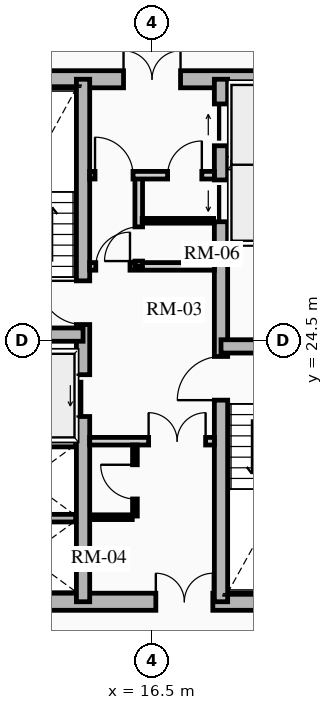
"""IFC4 building model, lengths in metres.
Left out: names, types, materials, properties, quantities, classifications, styles, units other than length and angle.
Written with IfcOpenShell. Run it as: python <this file> out.ifc"""

import sys

from ifc_helpers import new_model, si_unit, direction, frame, frame_2d, origin, place, context, subcontext, project, spatial, rectangle, extrude, source, transform, mapped, element, fill, save


model = new_model("IFC4")
c1 = context("Model", 3, precision=1e-05, world=origin(), true_north=direction((0.0, 1.0)))
c2 = subcontext(c1, "Body", "Model", "MODEL_VIEW")
j1 = project(units=[si_unit("LENGTHUNIT", "METRE"), si_unit("PLANEANGLEUNIT", "RADIAN")], contexts=[c1])
p1 = place(None, origin())
s1 = spatial("IfcSite", under=j1, at=p1, CompositionType="ELEMENT")
p2 = place(p1, origin())
s2 = spatial("IfcBuilding", under=s1, at=p2, CompositionType="ELEMENT")
p3 = place(p2, frame((0.0, 0.0, 90.52)))
s3 = spatial("IfcBuildingStorey", under=s2, at=p3, CompositionType="ELEMENT", Elevation=90.52)
p4 = place(p3, frame((11.15, 17.625, 0.0), z_axis=(0.0, 0.0, 1.0), x_axis=(1.0, 0.0, 0.0)))
e1 = element("IfcWall", 1, at=p4, inside=s3, PredefinedType="SHEAR", context=c2, shape_type="SweptSolid", body=[
    extrude(rectangle(XDim=10.7, YDim=0.45, at=frame_2d((5.35, 0.0))), origin(), (0.0, 0.0, 1.0), 2.91),
])
m1 = source(origin(), c2, "Body", "SweptSolid", [
    extrude(rectangle(XDim=1.5, YDim=2.02, at=frame_2d((0.75, 1.01))), frame((0.0, 0.235, 0.0), z_axis=(0.0, -1.0, 0.0), x_axis=(1.0, 0.0, 0.0)), (0.0, 0.0, 1.0), 0.47),
])
p5 = place(p4, frame((5.45, 0.0, 0.0)))
e2 = element("IfcOpeningElement", 2, at=p5, cuts=e1, PredefinedType="OPENING", context=c2, shape_type="MappedRepresentation", body=[
    mapped(m1, transform((0.0, 0.0, 0.0), x_axis=(1.0, 0.0, 0.0), y_axis=(0.0, 1.0, 0.0), z_axis=(0.0, 0.0, 1.0), scale=1.0)),
])
p6 = place(p3, frame((11.15, 31.375, 0.0), z_axis=(0.0, 0.0, 1.0), x_axis=(1.0, 0.0, 0.0)))
e3 = element("IfcWall", 3, at=p6, inside=s3, PredefinedType="SHEAR", context=c2, shape_type="SweptSolid", body=[
    extrude(rectangle(XDim=10.7, YDim=0.45, at=frame_2d((5.35, 0.0))), origin(), (0.0, 0.0, 1.0), 2.91),
])
p7 = place(p6, frame((4.6, 0.0, 0.0)))
e4 = element("IfcOpeningElement", 4, at=p7, cuts=e3, PredefinedType="OPENING", context=c2, shape_type="MappedRepresentation", body=[
    mapped(m1, transform((0.0, 0.0, 0.0), x_axis=(1.0, 0.0, 0.0), y_axis=(0.0, 1.0, 0.0), z_axis=(0.0, 0.0, 1.0), scale=1.0)),
])
p8 = place(p3, frame((14.685, 17.625, 0.0), z_axis=(0.0, 0.0, 1.0), x_axis=(0.0, 1.0, 0.0)))
e5 = element("IfcWall", 5, at=p8, inside=s3, PredefinedType="SHEAR", context=c2, shape_type="SweptSolid", body=[
    extrude(rectangle(XDim=13.75, YDim=0.35, at=frame_2d((6.875, 0.0))), origin(), (0.0, 0.0, 1.0), 2.91),
])
m2 = source(origin(), c2, "Body", "SweptSolid", [
    extrude(rectangle(XDim=1.1, YDim=2.015, at=frame_2d((0.55, 1.007))), frame((0.0, 0.185, 0.0), z_axis=(0.0, -1.0, 0.0), x_axis=(1.0, 0.0, 0.0)), (0.0, 0.0, 1.0), 0.37),
])
p9 = place(p8, frame((4.875, 0.0, 0.0)))
e6 = element("IfcOpeningElement", 6, at=p9, cuts=e5, PredefinedType="OPENING", context=c2, shape_type="MappedRepresentation", body=[
    mapped(m2, transform((0.0, 0.0, 0.0), x_axis=(1.0, 0.0, 0.0), y_axis=(0.0, 1.0, 0.0), z_axis=(0.0, 0.0, 1.0), scale=1.0)),
])
m3 = source(origin(), c2, "Body", "SweptSolid", [
    extrude(rectangle(XDim=1.15, YDim=2.02, at=frame_2d((0.575, 1.01))), frame((0.0, 0.185, 0.0), z_axis=(0.0, -1.0, 0.0), x_axis=(1.0, 0.0, 0.0)), (0.0, 0.0, 1.0), 0.37),
])
p10 = place(p8, frame((7.295, 0.0, 0.0)))
e7 = element("IfcOpeningElement", 7, at=p10, cuts=e5, PredefinedType="OPENING", context=c2, shape_type="MappedRepresentation", body=[
    mapped(m3, transform((0.0, 0.0, 0.0), x_axis=(1.0, 0.0, 0.0), y_axis=(0.0, 1.0, 0.0), z_axis=(0.0, 0.0, 1.0), scale=1.0)),
])
p11 = place(p3, frame((18.315, 17.625, 0.0), z_axis=(0.0, 0.0, 1.0), x_axis=(0.0, 1.0, 0.0)))
e8 = element("IfcWall", 8, at=p11, inside=s3, PredefinedType="SHEAR", context=c2, shape_type="SweptSolid", body=[
    extrude(rectangle(XDim=13.75, YDim=0.35, at=frame_2d((6.875, 0.0))), origin(), (0.0, 0.0, 1.0), 2.91),
])
p12 = place(p11, frame((10.0, 0.0, 0.0)))
e9 = element("IfcOpeningElement", 9, at=p12, cuts=e8, PredefinedType="OPENING", context=c2, shape_type="MappedRepresentation", body=[
    mapped(m2, transform((0.0, 0.0, 0.0), x_axis=(1.0, 0.0, 0.0), y_axis=(0.0, 1.0, 0.0), z_axis=(0.0, 0.0, 1.0), scale=1.0)),
])
p13 = place(p11, frame((12.0, 0.0, 0.0)))
e10 = element("IfcOpeningElement", 10, at=p13, cuts=e8, PredefinedType="OPENING", context=c2, shape_type="MappedRepresentation", body=[
    mapped(m2, transform((0.0, 0.0, 0.0), x_axis=(1.0, 0.0, 0.0), y_axis=(0.0, 1.0, 0.0), z_axis=(0.0, 0.0, 1.0), scale=1.0)),
])
p14 = place(p11, frame((5.305, 0.0, 0.0)))
e11 = element("IfcOpeningElement", 11, at=p14, cuts=e8, PredefinedType="OPENING", context=c2, shape_type="MappedRepresentation", body=[
    mapped(m3, transform((0.0, 0.0, 0.0), x_axis=(1.0, 0.0, 0.0), y_axis=(0.0, 1.0, 0.0), z_axis=(0.0, 0.0, 1.0), scale=1.0)),
])
for number, where, z_axis, x_axis in (
    (12, (11.4, 24.655, 0.0), (0.0, 0.0, 1.0), (1.0, 0.0, 0.0)),
    (13, (18.315, 24.345, 0.0), (0.0, 0.0, 1.0), (1.0, 0.0, 0.0)),
):
    element("IfcWall", number, at=place(p3, frame(where, z_axis=z_axis, x_axis=x_axis)), inside=s3, PredefinedType="SHEAR", context=c2, shape_type="SweptSolid", body=[
        extrude(rectangle(XDim=3.285, YDim=0.35, at=frame_2d((1.643, 0.0))), origin(), (0.0, 0.0, 1.0), 2.91),
    ])
for number, where, z_axis, x_axis in (
    (14, (11.52, 21.8, 0.0), (0.0, 0.0, 1.0), (1.0, 0.0, 0.0)),
    (15, (11.52, 19.825, 0.0), (0.0, 0.0, 1.0), (1.0, 0.0, 0.0)),
    (16, (18.51, 27.13, 0.0), (0.0, 0.0, 1.0), (1.0, 0.0, 0.0)),
    (17, (18.51, 29.175, 0.0), (0.0, 0.0, 1.0), (1.0, 0.0, 0.0)),
):
    element("IfcWall", number, at=place(p3, frame(where, z_axis=z_axis, x_axis=x_axis)), inside=s3, PredefinedType="SHEAR", context=c2, shape_type="SweptSolid", body=[
        extrude(rectangle(XDim=2.97, YDim=0.2, at=frame_2d((1.485, 0.0))), origin(), (0.0, 0.0, 1.0), 2.91),
    ])
p15 = place(p3, frame((14.86, 21.85, 0.0), z_axis=(0.0, 0.0, 1.0), x_axis=(1.0, 0.0, 0.0)))
e18 = element("IfcWall", 18, at=p15, inside=s3, PredefinedType="PARTITIONING", context=c2, shape_type="SweptSolid", body=[
    extrude(rectangle(XDim=3.28, YDim=0.2, at=frame_2d((1.64, 0.0))), origin(), (0.0, 0.0, 1.0), 2.655),
])
m4 = source(origin(), c2, "Body", "SweptSolid", [
    extrude(rectangle(XDim=1.5, YDim=2.02, at=frame_2d((0.75, 1.01))), frame((0.0, 0.11, 0.0), z_axis=(0.0, -1.0, 0.0), x_axis=(1.0, 0.0, 0.0)), (0.0, 0.0, 1.0), 0.22),
])
p16 = place(p15, frame((1.55, 0.0, 0.0)))
e19 = element("IfcOpeningElement", 19, at=p16, cuts=e18, PredefinedType="OPENING", context=c2, shape_type="MappedRepresentation", body=[
    mapped(m4, transform((0.0, 0.0, 0.0), x_axis=(1.0, 0.0, 0.0), y_axis=(0.0, 1.0, 0.0), z_axis=(0.0, 0.0, 1.0), scale=1.0)),
])
p17 = place(p3, frame((14.86, 26.45, 0.0), z_axis=(0.0, 0.0, 1.0), x_axis=(1.0, 0.0, 0.0)))
e20 = element("IfcWall", 20, at=p17, inside=s3, PredefinedType="PARTITIONING", context=c2, shape_type="SweptSolid", body=[
    extrude(rectangle(XDim=3.28, YDim=0.2, at=frame_2d((1.64, 0.0))), origin(), (0.0, 0.0, 1.0), 2.655),
])
m5 = source(origin(), c2, "Body", "SweptSolid", [
    extrude(rectangle(XDim=0.9, YDim=2.005, at=frame_2d((0.45, 1.002))), frame((0.0, 0.11, 0.0), z_axis=(0.0, -1.0, 0.0), x_axis=(1.0, 0.0, 0.0)), (0.0, 0.0, 1.0), 0.22),
])
p18 = place(p17, frame((0.16, 0.0, 0.0)))
e21 = element("IfcOpeningElement", 21, at=p18, cuts=e20, PredefinedType="OPENING", context=c2, shape_type="MappedRepresentation", body=[
    mapped(m5, transform((0.0, 0.0, 0.0), x_axis=(1.0, 0.0, 0.0), y_axis=(0.0, 1.0, 0.0), z_axis=(0.0, 0.0, 1.0), scale=1.0)),
])
p19 = place(p3, frame((16.15, 26.45, 0.0), z_axis=(0.0, 0.0, 1.0), x_axis=(0.0, 1.0, 0.0)))
e22 = element("IfcWall", 22, at=p19, inside=s3, PredefinedType="PARTITIONING", context=c2, shape_type="SweptSolid", body=[
    extrude(rectangle(XDim=2.4, YDim=0.2, at=frame_2d((1.2, 0.0))), origin(), (0.0, 0.0, 1.0), 2.655),
])
p20 = place(p19, frame((0.14, 0.0, 0.0)))
e23 = element("IfcOpeningElement", 23, at=p20, cuts=e22, PredefinedType="OPENING", context=c2, shape_type="MappedRepresentation", body=[
    mapped(m5, transform((0.0, 0.0, 0.0), x_axis=(1.0, 0.0, 0.0), y_axis=(0.0, 1.0, 0.0), z_axis=(0.0, 0.0, 1.0), scale=1.0)),
])
p21 = place(p3, frame((14.86, 28.85, 0.0), z_axis=(0.0, 0.0, 1.0), x_axis=(1.0, 0.0, 0.0)))
e24 = element("IfcWall", 24, at=p21, inside=s3, PredefinedType="PARTITIONING", context=c2, shape_type="SweptSolid", body=[
    extrude(rectangle(XDim=3.28, YDim=0.2, at=frame_2d((1.64, 0.0))), origin(), (0.0, 0.0, 1.0), 2.655),
])
m6 = source(origin(), c2, "Body", "SweptSolid", [
    extrude(rectangle(XDim=1.0, YDim=2.015, at=frame_2d((0.5, 1.007))), frame((0.0, 0.11, 0.0), z_axis=(0.0, -1.0, 0.0), x_axis=(1.0, 0.0, 0.0)), (0.0, 0.0, 1.0), 0.22),
])
p22 = place(p21, frame((0.14, 0.0, 0.0)))
e25 = element("IfcOpeningElement", 25, at=p22, cuts=e24, PredefinedType="OPENING", context=c2, shape_type="MappedRepresentation", body=[
    mapped(m6, transform((0.0, 0.0, 0.0), x_axis=(1.0, 0.0, 0.0), y_axis=(0.0, 1.0, 0.0), z_axis=(0.0, 0.0, 1.0), scale=1.0)),
])
p23 = place(p21, frame((2.05, 0.0, 0.0)))
e26 = element("IfcOpeningElement", 26, at=p23, cuts=e24, PredefinedType="OPENING", context=c2, shape_type="MappedRepresentation", body=[
    mapped(m5, transform((0.0, 0.0, 0.0), x_axis=(1.0, 0.0, 0.0), y_axis=(0.0, 1.0, 0.0), z_axis=(0.0, 0.0, 1.0), scale=1.0)),
])
p24 = place(p3, frame((16.05, 19.88, 0.0), z_axis=(0.0, 0.0, 1.0), x_axis=(0.0, 1.0, 0.0)))
e27 = element("IfcWall", 27, at=p24, inside=s3, PredefinedType="PARTITIONING", context=c2, shape_type="SweptSolid", body=[
    extrude(rectangle(XDim=1.87, YDim=0.125, at=frame_2d((0.935, 0.0))), origin(), (0.0, 0.0, 1.0), 2.655),
])
m7 = source(origin(), c2, "Body", "SweptSolid", [
    extrude(rectangle(XDim=0.9, YDim=2.005, at=frame_2d((0.45, 1.002))), frame((0.0, 0.073, 0.0), z_axis=(0.0, -1.0, 0.0), x_axis=(1.0, 0.0, 0.0)), (0.0, 0.0, 1.0), 0.145),
])
p25 = place(p24, frame((0.45, 0.0, 0.0)))
e28 = element("IfcOpeningElement", 28, at=p25, cuts=e27, PredefinedType="OPENING", context=c2, shape_type="MappedRepresentation", body=[
    mapped(m7, transform((0.0, 0.0, 0.0), x_axis=(1.0, 0.0, 0.0), y_axis=(0.0, 1.0, 0.0), z_axis=(0.0, 0.0, 1.0), scale=1.0)),
])
p26 = place(p3, frame((14.88, 19.85, 0.0), z_axis=(0.0, 0.0, 1.0), x_axis=(1.0, 0.0, 0.0)))
e29 = element("IfcWall", 29, at=p26, inside=s3, PredefinedType="PARTITIONING", context=c2, shape_type="SweptSolid", body=[
    extrude(rectangle(XDim=1.1, YDim=0.125, at=frame_2d((0.55, 0.0))), origin(), (0.0, 0.0, 1.0), 2.655),
])
p27 = place(p3, frame((16.24, 27.65, 0.0), z_axis=(0.0, 0.0, 1.0), x_axis=(1.0, 0.0, 0.0)))
e30 = element("IfcWall", 30, at=p27, inside=s3, PredefinedType="PARTITIONING", context=c2, shape_type="SweptSolid", body=[
    extrude(rectangle(XDim=1.88, YDim=0.125, at=frame_2d((0.94, 0.0))), origin(), (0.0, 0.0, 1.0), 2.655),
])
m8 = source(origin(), c2, "Body", "SweptSolid", [
    extrude(rectangle(XDim=1.1, YDim=2.015, at=frame_2d((0.55, 1.007))), frame((0.0, 0.025, 0.0), z_axis=(0.0, -1.0, 0.0), x_axis=(1.0, 0.0, 0.0)), (0.0, 0.0, 1.0), 0.05),
])
p28 = place(p9, origin())
e31 = element("IfcDoor", 31, at=p28, inside=s3, OperationType="SLIDING_TO_LEFT", PredefinedType="DOOR", context=c2, shape_type="MappedRepresentation", body=[
    mapped(m8, transform((0.0, 0.0, 0.0), x_axis=(1.0, 0.0, 0.0), y_axis=(0.0, 1.0, 0.0), z_axis=(0.0, 0.0, 1.0), scale=1.0)),
])
fill(e6, e31)
p29 = place(p12, origin())
e32 = element("IfcDoor", 32, at=p29, inside=s3, OperationType="SLIDING_TO_LEFT", PredefinedType="DOOR", context=c2, shape_type="MappedRepresentation", body=[
    mapped(m8, transform((0.0, 0.0, 0.0), x_axis=(1.0, 0.0, 0.0), y_axis=(0.0, 1.0, 0.0), z_axis=(0.0, 0.0, 1.0), scale=1.0)),
])
fill(e9, e32)
p30 = place(p13, origin())
e33 = element("IfcDoor", 33, at=p30, inside=s3, OperationType="SLIDING_TO_RIGHT", PredefinedType="DOOR", context=c2, shape_type="MappedRepresentation", body=[
    mapped(m8, transform((0.0, 0.0, 0.0), x_axis=(1.0, 0.0, 0.0), y_axis=(0.0, 1.0, 0.0), z_axis=(0.0, 0.0, 1.0), scale=1.0)),
])
fill(e10, e33)
m9 = source(origin(), c2, "Body", "SweptSolid", [
    extrude(rectangle(XDim=1.15, YDim=2.02, at=frame_2d((0.575, 1.01))), frame((0.0, 0.025, 0.0), z_axis=(0.0, -1.0, 0.0), x_axis=(1.0, 0.0, 0.0)), (0.0, 0.0, 1.0), 0.05),
])
p31 = place(p10, origin())
e34 = element("IfcDoor", 34, at=p31, inside=s3, OperationType="SINGLE_SWING_RIGHT", PredefinedType="DOOR", context=c2, shape_type="MappedRepresentation", body=[
    mapped(m9, transform((0.0, 0.0, 0.0), x_axis=(1.0, 0.0, 0.0), y_axis=(0.0, 1.0, 0.0), z_axis=(0.0, 0.0, 1.0), scale=1.0)),
])
fill(e7, e34)
p32 = place(p14, origin())
e35 = element("IfcDoor", 35, at=p32, inside=s3, OperationType="SINGLE_SWING_LEFT", PredefinedType="DOOR", context=c2, shape_type="MappedRepresentation", body=[
    mapped(m9, transform((0.0, 0.0, 0.0), x_axis=(1.0, 0.0, 0.0), y_axis=(0.0, 1.0, 0.0), z_axis=(0.0, 0.0, 1.0), scale=1.0)),
])
fill(e11, e35)
m10 = source(origin(), c2, "Body", "SweptSolid", [
    extrude(rectangle(XDim=1.5, YDim=2.02, at=frame_2d((0.75, 1.01))), frame((0.0, 0.025, 0.0), z_axis=(0.0, -1.0, 0.0), x_axis=(1.0, 0.0, 0.0)), (0.0, 0.0, 1.0), 0.05),
])
p33 = place(p7, origin())
e36 = element("IfcDoor", 36, at=p33, inside=s3, OperationType="DOUBLE_DOOR_SINGLE_SWING", PredefinedType="DOOR", context=c2, shape_type="MappedRepresentation", body=[
    mapped(m10, transform((0.0, 0.0, 0.0), x_axis=(1.0, 0.0, 0.0), y_axis=(0.0, 1.0, 0.0), z_axis=(0.0, 0.0, 1.0), scale=1.0)),
])
fill(e4, e36)
p34 = place(p5, origin())
e37 = element("IfcDoor", 37, at=p34, inside=s3, OperationType="DOUBLE_DOOR_SINGLE_SWING", PredefinedType="DOOR", context=c2, shape_type="MappedRepresentation", body=[
    mapped(m10, transform((0.0, 0.0, 0.0), x_axis=(1.0, 0.0, 0.0), y_axis=(0.0, 1.0, 0.0), z_axis=(0.0, 0.0, 1.0), scale=1.0)),
])
fill(e2, e37)
p35 = place(p16, origin())
e38 = element("IfcDoor", 38, at=p35, inside=s3, OperationType="DOUBLE_DOOR_SINGLE_SWING", PredefinedType="DOOR", context=c2, shape_type="MappedRepresentation", body=[
    mapped(m10, transform((0.0, 0.0, 0.0), x_axis=(1.0, 0.0, 0.0), y_axis=(0.0, 1.0, 0.0), z_axis=(0.0, 0.0, 1.0), scale=1.0)),
])
fill(e19, e38)
m11 = source(origin(), c2, "Body", "SweptSolid", [
    extrude(rectangle(XDim=0.9, YDim=2.005, at=frame_2d((0.45, 1.002))), frame((0.0, 0.025, 0.0), z_axis=(0.0, -1.0, 0.0), x_axis=(1.0, 0.0, 0.0)), (0.0, 0.0, 1.0), 0.05),
])
p36 = place(p18, origin())
e39 = element("IfcDoor", 39, at=p36, inside=s3, OperationType="SINGLE_SWING_RIGHT", PredefinedType="DOOR", context=c2, shape_type="MappedRepresentation", body=[
    mapped(m11, transform((0.0, 0.0, 0.0), x_axis=(1.0, 0.0, 0.0), y_axis=(0.0, 1.0, 0.0), z_axis=(0.0, 0.0, 1.0), scale=1.0)),
])
fill(e21, e39)
m12 = source(origin(), c2, "Body", "SweptSolid", [
    extrude(rectangle(XDim=1.0, YDim=2.015, at=frame_2d((0.5, 1.007))), frame((0.0, 0.025, 0.0), z_axis=(0.0, -1.0, 0.0), x_axis=(1.0, 0.0, 0.0)), (0.0, 0.0, 1.0), 0.05),
])
p37 = place(p22, origin())
e40 = element("IfcDoor", 40, at=p37, inside=s3, OperationType="SINGLE_SWING_LEFT", PredefinedType="DOOR", context=c2, shape_type="MappedRepresentation", body=[
    mapped(m12, transform((0.0, 0.0, 0.0), x_axis=(1.0, 0.0, 0.0), y_axis=(0.0, 1.0, 0.0), z_axis=(0.0, 0.0, 1.0), scale=1.0)),
])
fill(e25, e40)
p38 = place(p25, origin())
e41 = element("IfcDoor", 41, at=p38, inside=s3, OperationType="SINGLE_SWING_RIGHT", PredefinedType="DOOR", context=c2, shape_type="MappedRepresentation", body=[
    mapped(m11, transform((0.0, 0.0, 0.0), x_axis=(1.0, 0.0, 0.0), y_axis=(0.0, 1.0, 0.0), z_axis=(0.0, 0.0, 1.0), scale=1.0)),
])
fill(e28, e41)
p39 = place(p20, origin())
e42 = element("IfcDoor", 42, at=p39, inside=s3, OperationType="SINGLE_SWING_LEFT", PredefinedType="DOOR", context=c2, shape_type="MappedRepresentation", body=[
    mapped(m11, transform((0.0, 0.0, 0.0), x_axis=(1.0, 0.0, 0.0), y_axis=(0.0, 1.0, 0.0), z_axis=(0.0, 0.0, 1.0), scale=1.0)),
])
fill(e23, e42)
p40 = place(p23, origin())
e43 = element("IfcDoor", 43, at=p40, inside=s3, OperationType="SINGLE_SWING_RIGHT", PredefinedType="DOOR", context=c2, shape_type="MappedRepresentation", body=[
    mapped(m11, transform((0.0, 0.0, 0.0), x_axis=(1.0, 0.0, 0.0), y_axis=(0.0, 1.0, 0.0), z_axis=(0.0, 0.0, 1.0), scale=1.0)),
])
fill(e26, e43)
save(model, sys.argv[1])
